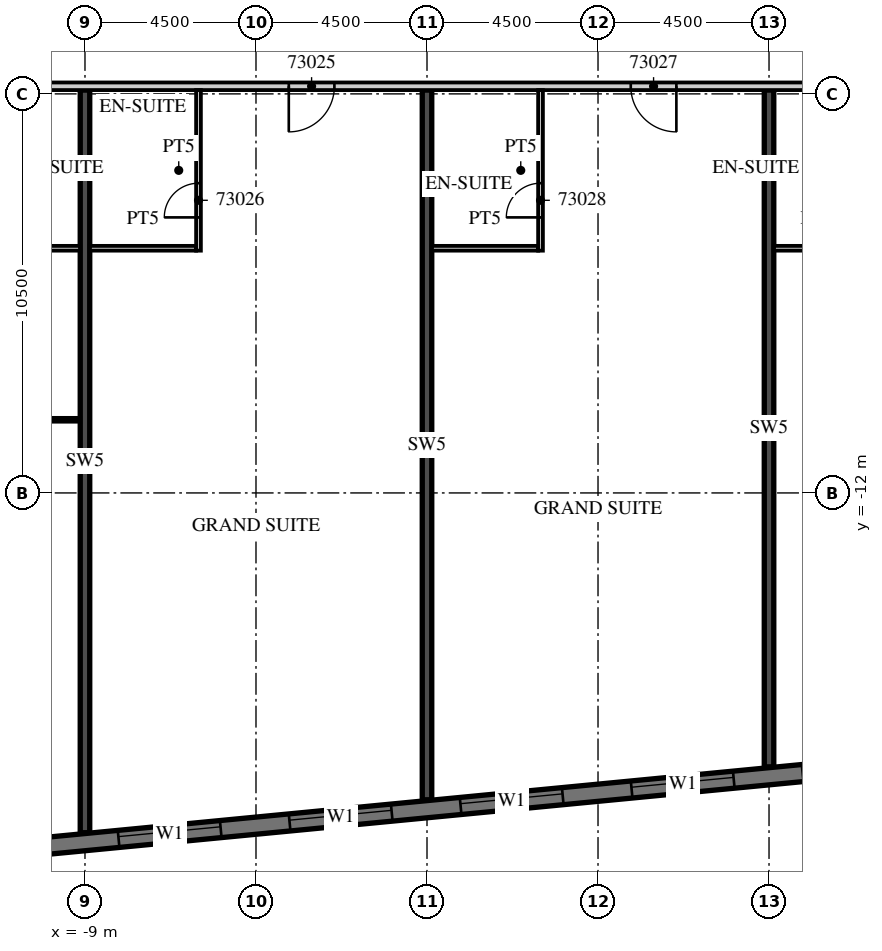
"""IFC4 building model, lengths in metres.
Left out: names, types, materials, properties, quantities, classifications, styles, units other than length and angle.
Written with IfcOpenShell. Run it as: python <this file> out.ifc"""

import sys

from ifc_helpers import new_model, si_unit, direction, frame, frame_2d, origin, place, context, subcontext, project, spatial, rectangle, extrude, element, fill, save


model = new_model("IFC4")
c1 = context("Model", 3, precision=1e-05, world=origin(), true_north=direction((0.0, 1.0)))
c2 = subcontext(c1, "Body", "Model", "MODEL_VIEW")
j1 = project(units=[si_unit("LENGTHUNIT", "METRE"), si_unit("PLANEANGLEUNIT", "RADIAN")], contexts=[c1])
p1 = place(None, origin())
s1 = spatial("IfcSite", under=j1, at=p1, CompositionType="ELEMENT")
p2 = place(p1, origin())
s2 = spatial("IfcBuilding", under=s1, at=p2, CompositionType="ELEMENT")
p3 = place(p2, frame((0.0, 0.0, 291.6)))
s3 = spatial("IfcBuildingStorey", under=s2, at=p3, CompositionType="ELEMENT", Elevation=291.6)
p4 = place(p3, frame((-9.0, -20.94, 0.0), z_axis=(0.0, 0.0, 1.0), x_axis=(0.0, 1.0, 0.0)))
e1 = element("IfcWall", 1, at=p4, inside=s3, PredefinedType="SHEAR", context=c2, shape_type="SweptSolid", body=[
    extrude(rectangle(XDim=19.541, YDim=0.25, at=frame_2d((9.77, 0.0))), origin(), (0.0, 0.0, 1.0), 3.3),
])
p5 = place(p3, frame((0.0, -20.074, 0.0), z_axis=(0.0, 0.0, 1.0), x_axis=(0.0, 1.0, 0.0)))
e2 = element("IfcWall", 2, at=p5, inside=s3, PredefinedType="SHEAR", context=c2, shape_type="SweptSolid", body=[
    extrude(rectangle(XDim=18.674, YDim=0.25, at=frame_2d((9.337, 0.0))), origin(), (0.0, 0.0, 1.0), 3.3),
])
p6 = place(p3, frame((9.0, -19.207, 0.0), z_axis=(0.0, 0.0, 1.0), x_axis=(0.0, 1.0, 0.0)))
e3 = element("IfcWall", 3, at=p6, inside=s3, PredefinedType="SHEAR", context=c2, shape_type="SweptSolid", body=[
    extrude(rectangle(XDim=17.807, YDim=0.25, at=frame_2d((8.904, 0.0))), origin(), (0.0, 0.0, 1.0), 3.3),
])
p7 = place(p3, frame((-13.521, -21.624, 0.0), z_axis=(0.0, 0.0, 1.0), x_axis=(0.995396186218, 0.095845878695, 0.0)))
e4 = element("IfcWall", 4, at=p7, inside=s3, PredefinedType="SOLIDWALL", context=c2, shape_type="SweptSolid", body=[
    extrude(rectangle(XDim=48.481, YDim=0.45, at=frame_2d((24.241, 0.0))), origin(), (0.0, 0.0, 1.0), 3.02),
])
p8 = place(p7, frame((0.91, 0.0, 0.45)))
e5 = element("IfcOpeningElement", 5, at=p8, cuts=e4, PredefinedType="OPENING", context=c2, shape_type="SweptSolid", body=[
    extrude(rectangle(XDim=2.7, YDim=2.25, at=frame_2d((1.35, 1.125))), frame((0.0, 0.235, 0.0), z_axis=(0.0, -1.0, 0.0), x_axis=(1.0, 0.0, 0.0)), (0.0, 0.0, 1.0), 0.47),
])
p9 = place(p7, frame((5.431, 0.0, 0.45)))
e6 = element("IfcOpeningElement", 6, at=p9, cuts=e4, PredefinedType="OPENING", context=c2, shape_type="SweptSolid", body=[
    extrude(rectangle(XDim=2.7, YDim=2.25, at=frame_2d((1.35, 1.125))), frame((0.0, 0.235, 0.0), z_axis=(0.0, -1.0, 0.0), x_axis=(1.0, 0.0, 0.0)), (0.0, 0.0, 1.0), 0.47),
])
p10 = place(p7, frame((9.952, 0.0, 0.45)))
e7 = element("IfcOpeningElement", 7, at=p10, cuts=e4, PredefinedType="OPENING", context=c2, shape_type="SweptSolid", body=[
    extrude(rectangle(XDim=2.7, YDim=2.25, at=frame_2d((1.35, 1.125))), frame((0.0, 0.235, 0.0), z_axis=(0.0, -1.0, 0.0), x_axis=(1.0, 0.0, 0.0)), (0.0, 0.0, 1.0), 0.47),
])
p11 = place(p7, frame((14.473, 0.0, 0.45)))
e8 = element("IfcOpeningElement", 8, at=p11, cuts=e4, PredefinedType="OPENING", context=c2, shape_type="SweptSolid", body=[
    extrude(rectangle(XDim=2.7, YDim=2.25, at=frame_2d((1.35, 1.125))), frame((0.0, 0.235, 0.0), z_axis=(0.0, -1.0, 0.0), x_axis=(1.0, 0.0, 0.0)), (0.0, 0.0, 1.0), 0.47),
])
p12 = place(p7, frame((18.994, 0.0, 0.45)))
e9 = element("IfcOpeningElement", 9, at=p12, cuts=e4, PredefinedType="OPENING", context=c2, shape_type="SweptSolid", body=[
    extrude(rectangle(XDim=2.7, YDim=2.25, at=frame_2d((1.35, 1.125))), frame((0.0, 0.235, 0.0), z_axis=(0.0, -1.0, 0.0), x_axis=(1.0, 0.0, 0.0)), (0.0, 0.0, 1.0), 0.47),
])
p13 = place(p7, frame((23.514, 0.0, 0.45)))
e10 = element("IfcOpeningElement", 10, at=p13, cuts=e4, PredefinedType="OPENING", context=c2, shape_type="SweptSolid", body=[
    extrude(rectangle(XDim=2.7, YDim=2.25, at=frame_2d((1.35, 1.125))), frame((0.0, 0.235, 0.0), z_axis=(0.0, -1.0, 0.0), x_axis=(1.0, 0.0, 0.0)), (0.0, 0.0, 1.0), 0.47),
])
p14 = place(p7, frame((28.035, 0.0, 0.45)))
e11 = element("IfcOpeningElement", 11, at=p14, cuts=e4, PredefinedType="OPENING", context=c2, shape_type="SweptSolid", body=[
    extrude(rectangle(XDim=2.7, YDim=2.25, at=frame_2d((1.35, 1.125))), frame((0.0, 0.235, 0.0), z_axis=(0.0, -1.0, 0.0), x_axis=(1.0, 0.0, 0.0)), (0.0, 0.0, 1.0), 0.47),
])
p15 = place(p7, frame((32.556, 0.0, 0.45)))
e12 = element("IfcOpeningElement", 12, at=p15, cuts=e4, PredefinedType="OPENING", context=c2, shape_type="SweptSolid", body=[
    extrude(rectangle(XDim=2.7, YDim=2.25, at=frame_2d((1.35, 1.125))), frame((0.0, 0.235, 0.0), z_axis=(0.0, -1.0, 0.0), x_axis=(1.0, 0.0, 0.0)), (0.0, 0.0, 1.0), 0.47),
])
p16 = place(p7, frame((37.077, 0.0, 0.45)))
e13 = element("IfcOpeningElement", 13, at=p16, cuts=e4, PredefinedType="OPENING", context=c2, shape_type="SweptSolid", body=[
    extrude(rectangle(XDim=2.7, YDim=2.25, at=frame_2d((1.35, 1.125))), frame((0.0, 0.235, 0.0), z_axis=(0.0, -1.0, 0.0), x_axis=(1.0, 0.0, 0.0)), (0.0, 0.0, 1.0), 0.47),
])
p17 = place(p7, frame((41.598, 0.0, 0.45)))
e14 = element("IfcOpeningElement", 14, at=p17, cuts=e4, PredefinedType="OPENING", context=c2, shape_type="SweptSolid", body=[
    extrude(rectangle(XDim=2.7, YDim=2.25, at=frame_2d((1.35, 1.125))), frame((0.0, 0.235, 0.0), z_axis=(0.0, -1.0, 0.0), x_axis=(1.0, 0.0, 0.0)), (0.0, 0.0, 1.0), 0.47),
])
p18 = place(p3, frame((-13.5, -1.3, 0.0), z_axis=(0.0, 0.0, 1.0), x_axis=(1.0, 0.0, 0.0)))
e15 = element("IfcWall", 15, at=p18, inside=s3, PredefinedType="PARTITIONING", context=c2, shape_type="SweptSolid", body=[
    extrude(rectangle(XDim=50.293, YDim=0.2, at=frame_2d((25.146, 0.0))), origin(), (0.0, 0.0, 1.0), 3.02),
])
p19 = place(p18, frame((0.575, 0.0, 0.0)))
e16 = element("IfcOpeningElement", 16, at=p19, cuts=e15, PredefinedType="OPENING", context=c2, shape_type="SweptSolid", body=[
    extrude(rectangle(XDim=1.0, YDim=2.1, at=frame_2d((0.5, 1.05))), frame((0.0, 0.11, 0.0), z_axis=(0.0, -1.0, 0.0), x_axis=(1.0, 0.0, 0.0)), (0.0, 0.0, 1.0), 0.22),
])
p20 = place(p18, frame((9.863, 0.0, 0.0)))
e17 = element("IfcOpeningElement", 17, at=p20, cuts=e15, PredefinedType="OPENING", context=c2, shape_type="SweptSolid", body=[
    extrude(rectangle(XDim=1.2, YDim=2.1, at=frame_2d((0.6, 1.05))), frame((0.0, 0.11, 0.0), z_axis=(0.0, -1.0, 0.0), x_axis=(1.0, 0.0, 0.0)), (0.0, 0.0, 1.0), 0.22),
])
p21 = place(p18, frame((18.862, 0.0, 0.0)))
e18 = element("IfcOpeningElement", 18, at=p21, cuts=e15, PredefinedType="OPENING", context=c2, shape_type="SweptSolid", body=[
    extrude(rectangle(XDim=1.2, YDim=2.1, at=frame_2d((0.6, 1.05))), frame((0.0, 0.11, 0.0), z_axis=(0.0, -1.0, 0.0), x_axis=(1.0, 0.0, 0.0)), (0.0, 0.0, 1.0), 0.22),
])
p22 = place(p18, frame((25.45, 0.0, 0.0)))
e19 = element("IfcOpeningElement", 19, at=p22, cuts=e15, PredefinedType="OPENING", context=c2, shape_type="SweptSolid", body=[
    extrude(rectangle(XDim=1.0, YDim=2.1, at=frame_2d((0.5, 1.05))), frame((0.0, 0.11, 0.0), z_axis=(0.0, -1.0, 0.0), x_axis=(1.0, 0.0, 0.0)), (0.0, 0.0, 1.0), 0.22),
])
p23 = place(p18, frame((27.55, 0.0, 0.0)))
e20 = element("IfcOpeningElement", 20, at=p23, cuts=e15, PredefinedType="OPENING", context=c2, shape_type="SweptSolid", body=[
    extrude(rectangle(XDim=1.0, YDim=2.1, at=frame_2d((0.5, 1.05))), frame((0.0, 0.11, 0.0), z_axis=(0.0, -1.0, 0.0), x_axis=(1.0, 0.0, 0.0)), (0.0, 0.0, 1.0), 0.22),
])
p24 = place(p18, frame((33.938, 0.0, 0.0)))
e21 = element("IfcOpeningElement", 21, at=p24, cuts=e15, PredefinedType="OPENING", context=c2, shape_type="SweptSolid", body=[
    extrude(rectangle(XDim=1.2, YDim=2.1, at=frame_2d((0.6, 1.05))), frame((0.0, 0.11, 0.0), z_axis=(0.0, -1.0, 0.0), x_axis=(1.0, 0.0, 0.0)), (0.0, 0.0, 1.0), 0.22),
])
p25 = place(p18, frame((42.938, 0.0, 0.0)))
e22 = element("IfcOpeningElement", 22, at=p25, cuts=e15, PredefinedType="OPENING", context=c2, shape_type="SweptSolid", body=[
    extrude(rectangle(XDim=1.2, YDim=2.1, at=frame_2d((0.6, 1.05))), frame((0.0, 0.11, 0.0), z_axis=(0.0, -1.0, 0.0), x_axis=(1.0, 0.0, 0.0)), (0.0, 0.0, 1.0), 0.22),
])
p26 = place(p3, frame((-11.375, -5.562, 0.0), z_axis=(0.0, 0.0, 1.0), x_axis=(1.0, 0.0, 0.0)))
e23 = element("IfcWall", 23, at=p26, inside=s3, PredefinedType="PARTITIONING", context=c2, shape_type="SweptSolid", body=[
    extrude(rectangle(XDim=2.25, YDim=0.125, at=frame_2d((1.125, 0.0))), origin(), (0.0, 0.0, 1.0), 3.02),
])
p27 = place(p3, frame((-13.4, -10.075, 0.0), z_axis=(0.0, 0.0, 1.0), x_axis=(1.0, 0.0, 0.0)))
e24 = element("IfcWall", 24, at=p27, inside=s3, PredefinedType="PARTITIONING", context=c2, shape_type="SweptSolid", body=[
    extrude(rectangle(XDim=4.275, YDim=0.1, at=frame_2d((2.137, 0.0))), origin(), (0.0, 0.0, 1.0), 3.02),
])
p28 = place(p27, frame((1.388, 0.0, 0.0)))
e25 = element("IfcOpeningElement", 25, at=p28, cuts=e24, PredefinedType="OPENING", context=c2, shape_type="SweptSolid", body=[
    extrude(rectangle(XDim=1.5, YDim=2.1, at=frame_2d((0.75, 1.05))), frame((0.0, 0.06, 0.0), z_axis=(0.0, -1.0, 0.0), x_axis=(1.0, 0.0, 0.0)), (0.0, 0.0, 1.0), 0.12),
])
p29 = place(p3, frame((-6.013, -5.625, 0.0), z_axis=(0.0, 0.0, 1.0), x_axis=(0.0, 1.0, 0.0)))
e26 = element("IfcWall", 26, at=p29, inside=s3, PredefinedType="PARTITIONING", context=c2, shape_type="SweptSolid", body=[
    extrude(rectangle(XDim=4.225, YDim=0.125, at=frame_2d((2.113, 0.0))), origin(), (0.0, 0.0, 1.0), 3.02),
])
p30 = place(p29, frame((0.875, 0.0, 0.0)))
e27 = element("IfcOpeningElement", 27, at=p30, cuts=e26, PredefinedType="OPENING", context=c2, shape_type="SweptSolid", body=[
    extrude(rectangle(XDim=0.9, YDim=2.1, at=frame_2d((0.45, 1.05))), frame((0.0, 0.073, 0.0), z_axis=(0.0, -1.0, 0.0), x_axis=(1.0, 0.0, 0.0)), (0.0, 0.0, 1.0), 0.145),
])
p31 = place(p3, frame((-8.875, -5.562, 0.0), z_axis=(0.0, 0.0, 1.0), x_axis=(1.0, 0.0, 0.0)))
e28 = element("IfcWall", 28, at=p31, inside=s3, PredefinedType="PARTITIONING", context=c2, shape_type="SweptSolid", body=[
    extrude(rectangle(XDim=2.8, YDim=0.125, at=frame_2d((1.4, 0.0))), origin(), (0.0, 0.0, 1.0), 3.02),
])
p32 = place(p3, frame((2.987, -5.625, 0.0), z_axis=(0.0, 0.0, 1.0), x_axis=(0.0, 1.0, 0.0)))
e29 = element("IfcWall", 29, at=p32, inside=s3, PredefinedType="PARTITIONING", context=c2, shape_type="SweptSolid", body=[
    extrude(rectangle(XDim=4.225, YDim=0.125, at=frame_2d((2.113, 0.0))), origin(), (0.0, 0.0, 1.0), 3.02),
])
p33 = place(p32, frame((0.875, 0.0, 0.0)))
e30 = element("IfcOpeningElement", 30, at=p33, cuts=e29, PredefinedType="OPENING", context=c2, shape_type="SweptSolid", body=[
    extrude(rectangle(XDim=0.9, YDim=2.1, at=frame_2d((0.45, 1.05))), frame((0.0, 0.073, 0.0), z_axis=(0.0, -1.0, 0.0), x_axis=(1.0, 0.0, 0.0)), (0.0, 0.0, 1.0), 0.145),
])
p34 = place(p3, frame((0.125, -5.562, 0.0), z_axis=(0.0, 0.0, 1.0), x_axis=(1.0, 0.0, 0.0)))
e31 = element("IfcWall", 31, at=p34, inside=s3, PredefinedType="PARTITIONING", context=c2, shape_type="SweptSolid", body=[
    extrude(rectangle(XDim=2.8, YDim=0.125, at=frame_2d((1.4, 0.0))), origin(), (0.0, 0.0, 1.0), 3.02),
])
p35 = place(p3, frame((9.125, -5.562, 0.0), z_axis=(0.0, 0.0, 1.0), x_axis=(1.0, 0.0, 0.0)))
e32 = element("IfcWall", 32, at=p35, inside=s3, PredefinedType="PARTITIONING", context=c2, shape_type="SweptSolid", body=[
    extrude(rectangle(XDim=2.25, YDim=0.125, at=frame_2d((1.125, 0.0))), origin(), (0.0, 0.0, 1.0), 3.02),
])
p36 = place(p9, origin())
e33 = element("IfcWindow", 33, at=p36, inside=s3, PartitioningType="SINGLE_PANEL", PredefinedType="WINDOW", context=c2, shape_type="SweptSolid", body=[
    extrude(rectangle(XDim=2.7, YDim=2.25, at=frame_2d((1.35, 1.125))), frame((0.0, 0.09, 0.0), z_axis=(0.0, -1.0, 0.0), x_axis=(1.0, 0.0, 0.0)), (0.0, 0.0, 1.0), 0.06),
])
fill(e6, e33)
p37 = place(p10, origin())
e34 = element("IfcWindow", 34, at=p37, inside=s3, PartitioningType="SINGLE_PANEL", PredefinedType="WINDOW", context=c2, shape_type="SweptSolid", body=[
    extrude(rectangle(XDim=2.7, YDim=2.25, at=frame_2d((1.35, 1.125))), frame((0.0, 0.09, 0.0), z_axis=(0.0, -1.0, 0.0), x_axis=(1.0, 0.0, 0.0)), (0.0, 0.0, 1.0), 0.06),
])
fill(e7, e34)
p38 = place(p11, origin())
e35 = element("IfcWindow", 35, at=p38, inside=s3, PartitioningType="SINGLE_PANEL", PredefinedType="WINDOW", context=c2, shape_type="SweptSolid", body=[
    extrude(rectangle(XDim=2.7, YDim=2.25, at=frame_2d((1.35, 1.125))), frame((0.0, 0.09, 0.0), z_axis=(0.0, -1.0, 0.0), x_axis=(1.0, 0.0, 0.0)), (0.0, 0.0, 1.0), 0.06),
])
fill(e8, e35)
p39 = place(p12, origin())
e36 = element("IfcWindow", 36, at=p39, inside=s3, PartitioningType="SINGLE_PANEL", PredefinedType="WINDOW", context=c2, shape_type="SweptSolid", body=[
    extrude(rectangle(XDim=2.7, YDim=2.25, at=frame_2d((1.35, 1.125))), frame((0.0, 0.09, 0.0), z_axis=(0.0, -1.0, 0.0), x_axis=(1.0, 0.0, 0.0)), (0.0, 0.0, 1.0), 0.06),
])
fill(e9, e36)
p40 = place(p20, origin())
e37 = element("IfcDoor", 37, at=p40, inside=s3, OperationType="SINGLE_SWING_LEFT", PredefinedType="DOOR", context=c2, shape_type="SweptSolid", body=[
    extrude(rectangle(XDim=1.2, YDim=2.1, at=frame_2d((0.6, 1.05))), frame((0.0, 0.025, 0.0), z_axis=(0.0, -1.0, 0.0), x_axis=(1.0, 0.0, 0.0)), (0.0, 0.0, 1.0), 0.05),
])
fill(e17, e37)
p41 = place(p30, origin())
e38 = element("IfcDoor", 38, at=p41, inside=s3, OperationType="SINGLE_SWING_LEFT", PredefinedType="DOOR", context=c2, shape_type="SweptSolid", body=[
    extrude(rectangle(XDim=0.9, YDim=2.1, at=frame_2d((0.45, 1.05))), frame((0.0, 0.025, 0.0), z_axis=(0.0, -1.0, 0.0), x_axis=(1.0, 0.0, 0.0)), (0.0, 0.0, 1.0), 0.05),
])
fill(e27, e38)
p42 = place(p21, origin())
e39 = element("IfcDoor", 39, at=p42, inside=s3, OperationType="SINGLE_SWING_RIGHT", PredefinedType="DOOR", context=c2, shape_type="SweptSolid", body=[
    extrude(rectangle(XDim=1.2, YDim=2.1, at=frame_2d((0.6, 1.05))), frame((0.0, 0.025, 0.0), z_axis=(0.0, -1.0, 0.0), x_axis=(1.0, 0.0, 0.0)), (0.0, 0.0, 1.0), 0.05),
])
fill(e18, e39)
p43 = place(p33, origin())
e40 = element("IfcDoor", 40, at=p43, inside=s3, OperationType="SINGLE_SWING_LEFT", PredefinedType="DOOR", context=c2, shape_type="SweptSolid", body=[
    extrude(rectangle(XDim=0.9, YDim=2.1, at=frame_2d((0.45, 1.05))), frame((0.0, 0.025, 0.0), z_axis=(0.0, -1.0, 0.0), x_axis=(1.0, 0.0, 0.0)), (0.0, 0.0, 1.0), 0.05),
])
fill(e30, e40)
save(model, sys.argv[1])
